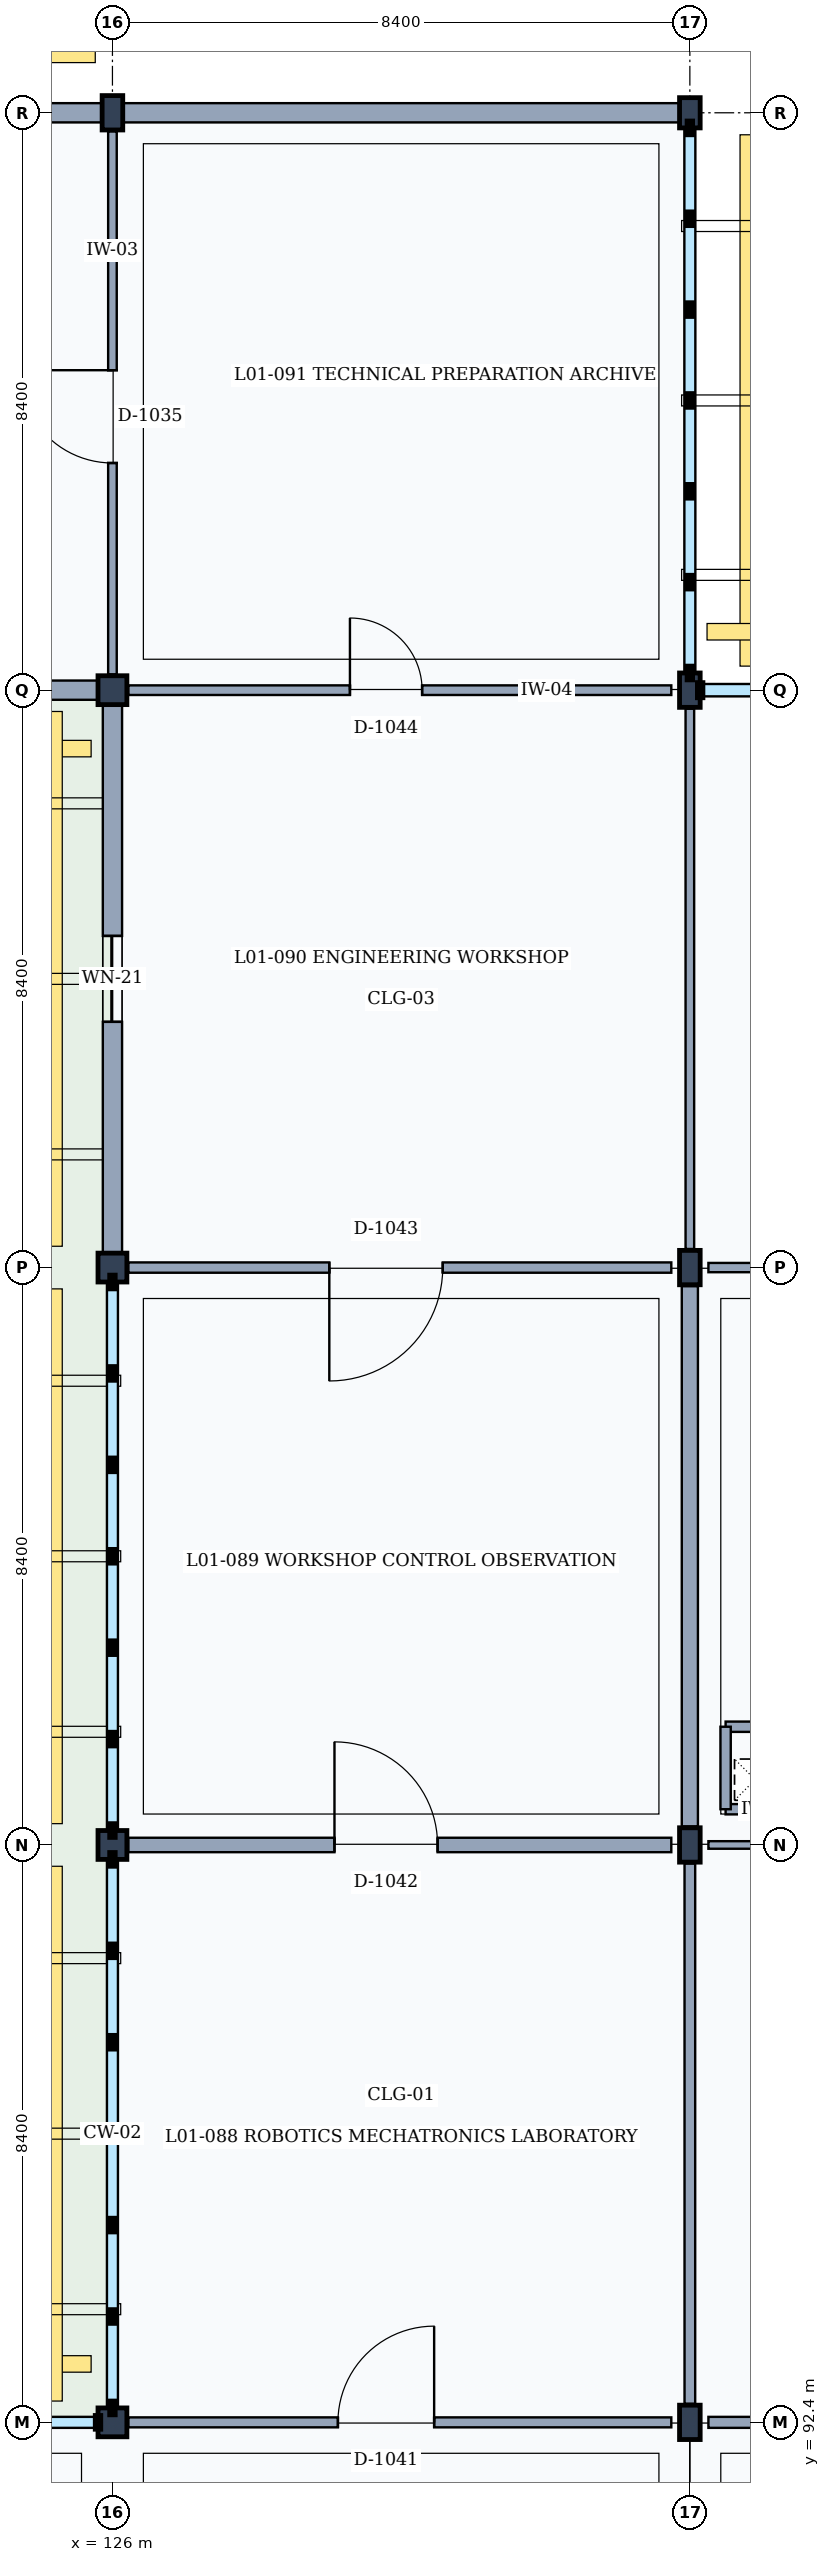
"""IFC4 building model, lengths in metres.
Left out: names, types, materials, properties, quantities, classifications, styles, units other than length and angle.
Written with IfcOpenShell. Run it as: python <this file> out.ifc"""

import sys

from ifc_helpers import new_model, si_unit, direction, frame, frame_2d, origin, origin_2d, place, context, subcontext, project, spatial, rectangle, i_section, extrude, element, fill, save


model = new_model("IFC4")
c1 = context("Model", 3, precision=1e-05, world=origin(), true_north=direction((0.0, 1.0)))
c2 = subcontext(c1, "Body", "Model", "MODEL_VIEW")
j1 = project(units=[si_unit("LENGTHUNIT", "METRE"), si_unit("PLANEANGLEUNIT", "RADIAN")], contexts=[c1])
p1 = place(None, origin())
s1 = spatial("IfcSite", under=j1, at=p1, CompositionType="ELEMENT")
p2 = place(p1, origin())
s2 = spatial("IfcBuilding", under=s1, at=p2, CompositionType="ELEMENT")
p3 = place(p2, frame((0.0, 0.0, 4.8)))
s3 = spatial("IfcBuildingStorey", under=s2, at=p3, CompositionType="ELEMENT", Elevation=4.8)
for number, where, z_axis, x_axis in (
    (1, (126.0, 92.4, 0.0), (0.0, 0.0, 1.0), (1.0, 0.0, 0.0)),
    (2, (126.0, 100.8, 0.0), (0.0, 0.0, 1.0), (1.0, 0.0, 0.0)),
    (3, (126.0, 109.2, 0.0), (0.0, 0.0, 1.0), (1.0, 0.0, 0.0)),
    (4, (126.0, 117.6, 0.0), (0.0, 0.0, 1.0), (1.0, 0.0, 0.0)),
):
    element("IfcColumn", number, at=place(p3, frame(where, z_axis=z_axis, x_axis=x_axis)), inside=s3, PredefinedType="COLUMN", context=c2, shape_type="SweptSolid", body=[
        extrude(rectangle(XDim=0.42, YDim=0.42, at=origin_2d()), origin(), (0.0, 0.0, 1.0), 4.8),
    ])
for number, where, z_axis, x_axis in (
    (5, (126.0, 126.0, 0.0), (0.0, 0.0, 1.0), (1.0, 0.0, 0.0)),
    (6, (134.4, 92.4, 0.0), (0.0, 0.0, 1.0), (1.0, 0.0, 0.0)),
    (7, (134.4, 100.8, 0.0), (0.0, 0.0, 1.0), (1.0, 0.0, 0.0)),
    (8, (134.4, 109.2, 0.0), (0.0, 0.0, 1.0), (1.0, 0.0, 0.0)),
    (9, (134.4, 117.6, 0.0), (0.0, 0.0, 1.0), (1.0, 0.0, 0.0)),
):
    element("IfcColumn", number, at=place(p3, frame(where, z_axis=z_axis, x_axis=x_axis)), inside=s3, PredefinedType="COLUMN", context=c2, shape_type="SweptSolid", body=[
        extrude(i_section(OverallWidth=0.3, OverallDepth=0.5, WebThickness=0.014, FlangeThickness=0.028, FilletRadius=0.027, at=origin_2d()), origin(), (0.0, 0.0, 1.0), 4.8),
    ])
p4 = place(p3, frame((134.4, 126.0, 0.0), z_axis=(0.0, 0.0, 1.0), x_axis=(1.0, 0.0, 0.0)))
e10 = element("IfcColumn", 10, at=p4, inside=s3, PredefinedType="COLUMN", context=c2, shape_type="SweptSolid", body=[
    extrude(i_section(OverallWidth=0.3, OverallDepth=0.44, WebThickness=0.011, FlangeThickness=0.021, FilletRadius=0.027, at=origin_2d()), origin(), (0.0, 0.0, 1.0), 4.8),
])
p5 = place(p3, frame((125.79, 117.6, 0.0), z_axis=(0.0, 0.0, 1.0), x_axis=(-1.0, 0.0, 0.0)))
e11 = element("IfcWall", 11, at=p5, inside=s3, PredefinedType="SOLIDWALL", context=c2, shape_type="SweptSolid", body=[
    extrude(rectangle(XDim=8.0, YDim=0.28, at=frame_2d((4.0, 0.0))), origin(), (0.0, 0.0, 1.0), 3.35),
])
p6 = place(p5, frame((2.85, 0.0, 0.9)))
e12 = element("IfcOpeningElement", 12, at=p6, cuts=e11, PredefinedType="OPENING", context=c2, shape_type="SweptSolid", body=[
    extrude(rectangle(XDim=2.3, YDim=1.5, at=frame_2d((1.15, 0.75))), frame((0.0, 0.15, 0.0), z_axis=(0.0, -1.0, 0.0), x_axis=(1.0, 0.0, 0.0)), (0.0, 0.0, 1.0), 0.3),
])
p7 = place(p3, frame((117.75, 126.0, 0.0), z_axis=(0.0, 0.0, 1.0), x_axis=(1.0, 0.0, 0.0)))
e13 = element("IfcWall", 13, at=p7, inside=s3, PredefinedType="SOLIDWALL", context=c2, shape_type="SweptSolid", body=[
    extrude(rectangle(XDim=8.1, YDim=0.28, at=frame_2d((4.05, 0.0))), origin(), (0.0, 0.0, 1.0), 3.96),
])
p8 = place(p7, frame((2.9, 0.0, 0.9)))
e14 = element("IfcOpeningElement", 14, at=p8, cuts=e13, PredefinedType="OPENING", context=c2, shape_type="SweptSolid", body=[
    extrude(rectangle(XDim=2.3, YDim=1.5, at=frame_2d((1.15, 0.75))), frame((0.0, 0.15, 0.0), z_axis=(0.0, -1.0, 0.0), x_axis=(1.0, 0.0, 0.0)), (0.0, 0.0, 1.0), 0.3),
])
p9 = place(p3, frame((126.0, 109.41, 0.0), z_axis=(0.0, 0.0, 1.0), x_axis=(0.0, 1.0, 0.0)))
e15 = element("IfcWall", 15, at=p9, inside=s3, PredefinedType="SOLIDWALL", context=c2, shape_type="SweptSolid", body=[
    extrude(rectangle(XDim=7.98, YDim=0.28, at=frame_2d((3.99, 0.0))), origin(), (0.0, 0.0, 1.0), 3.96),
])
p10 = place(p9, frame((3.365, 0.0, 0.9)))
e16 = element("IfcOpeningElement", 16, at=p10, cuts=e15, PredefinedType="OPENING", context=c2, shape_type="SweptSolid", body=[
    extrude(rectangle(XDim=1.25, YDim=1.7, at=frame_2d((0.625, 0.85))), frame((0.0, 0.15, 0.0), z_axis=(0.0, -1.0, 0.0), x_axis=(1.0, 0.0, 0.0)), (0.0, 0.0, 1.0), 0.3),
])
p11 = place(p3, frame((126.15, 126.0, 0.0), z_axis=(0.0, 0.0, 1.0), x_axis=(1.0, 0.0, 0.0)))
e17 = element("IfcWall", 17, at=p11, inside=s3, PredefinedType="SOLIDWALL", context=c2, shape_type="SweptSolid", body=[
    extrude(rectangle(XDim=8.1, YDim=0.28, at=frame_2d((4.05, 0.0))), origin(), (0.0, 0.0, 1.0), 3.96),
])
for number, where, z_axis, x_axis in (
    (18, (134.92, 101.32, 0.0), (0.0, 0.0, 1.0), (1.0, 0.0, 0.0)),
    (19, (136.12, 102.52, 0.0), (0.0, 0.0, 1.0), (-1.0, 0.0, 0.0)),
):
    element("IfcWall", number, at=place(p3, frame(where, z_axis=z_axis, x_axis=x_axis)), inside=s3, PredefinedType="PARTITIONING", context=c2, shape_type="SweptSolid", body=[
        extrude(rectangle(XDim=1.2, YDim=0.15, at=frame_2d((0.6, 0.0))), origin(), (0.0, 0.0, 1.0), 4.55),
    ])
p12 = place(p3, frame((134.92, 102.52, 0.0), z_axis=(0.0, 0.0, 1.0), x_axis=(0.0, -1.0, 0.0)))
e20 = element("IfcWall", 20, at=p12, inside=s3, PredefinedType="PARTITIONING", context=c2, shape_type="SweptSolid", body=[
    extrude(rectangle(XDim=1.2, YDim=0.15, at=frame_2d((0.6, 0.0))), origin(), (0.0, 0.0, 1.0), 4.55),
])
p13 = place(p3, frame((126.0, 117.83, 0.0), z_axis=(0.0, 0.0, 1.0), x_axis=(0.0, 1.0, 0.0)))
e21 = element("IfcWall", 21, at=p13, inside=s3, PredefinedType="PARTITIONING", context=c2, shape_type="SweptSolid", body=[
    extrude(rectangle(XDim=7.9, YDim=0.125, at=frame_2d((3.95, 0.0))), origin(), (0.0, 0.0, 1.0), 3.92),
])
p14 = place(p13, frame((3.075, 0.0, 0.0)))
e22 = element("IfcOpeningElement", 22, at=p14, cuts=e21, PredefinedType="OPENING", context=c2, shape_type="SweptSolid", body=[
    extrude(rectangle(XDim=1.35, YDim=2.25, at=frame_2d((0.675, 1.125))), frame((0.0, 0.073, 0.0), z_axis=(0.0, -1.0, 0.0), x_axis=(1.0, 0.0, 0.0)), (0.0, 0.0, 1.0), 0.145),
])
p15 = place(p3, frame((126.23, 92.4, 0.0), z_axis=(0.0, 0.0, 1.0), x_axis=(1.0, 0.0, 0.0)))
e23 = element("IfcWall", 23, at=p15, inside=s3, PredefinedType="PARTITIONING", context=c2, shape_type="SweptSolid", body=[
    extrude(rectangle(XDim=7.9, YDim=0.145, at=frame_2d((3.95, 0.0))), origin(), (0.0, 0.0, 1.0), 3.92),
])
p16 = place(p15, frame((3.05, 0.0, 0.0)))
e24 = element("IfcOpeningElement", 24, at=p16, cuts=e23, PredefinedType="OPENING", context=c2, shape_type="SweptSolid", body=[
    extrude(rectangle(XDim=1.4, YDim=2.25, at=frame_2d((0.7, 1.125))), frame((0.0, 0.083, 0.0), z_axis=(0.0, -1.0, 0.0), x_axis=(1.0, 0.0, 0.0)), (0.0, 0.0, 1.0), 0.165),
])
p17 = place(p3, frame((134.4, 92.67, 0.0), z_axis=(0.0, 0.0, 1.0), x_axis=(0.0, 1.0, 0.0)))
e25 = element("IfcWall", 25, at=p17, inside=s3, PredefinedType="PARTITIONING", context=c2, shape_type="SweptSolid", body=[
    extrude(rectangle(XDim=7.86, YDim=0.155, at=frame_2d((3.93, 0.0))), origin(), (0.0, 0.0, 1.0), 3.92),
])
p18 = place(p3, frame((126.23, 100.8, 0.0), z_axis=(0.0, 0.0, 1.0), x_axis=(1.0, 0.0, 0.0)))
e26 = element("IfcWall", 26, at=p18, inside=s3, PredefinedType="PARTITIONING", context=c2, shape_type="SweptSolid", body=[
    extrude(rectangle(XDim=7.9, YDim=0.21, at=frame_2d((3.95, 0.0))), origin(), (0.0, 0.0, 1.0), 3.92),
])
p19 = place(p18, frame((3.0, 0.0, 0.0)))
e27 = element("IfcOpeningElement", 27, at=p19, cuts=e26, PredefinedType="OPENING", context=c2, shape_type="SweptSolid", body=[
    extrude(rectangle(XDim=1.5, YDim=2.3, at=frame_2d((0.75, 1.15))), frame((0.0, 0.115, 0.0), z_axis=(0.0, -1.0, 0.0), x_axis=(1.0, 0.0, 0.0)), (0.0, 0.0, 1.0), 0.23),
])
p20 = place(p3, frame((134.4, 101.07, 0.0), z_axis=(0.0, 0.0, 1.0), x_axis=(0.0, 1.0, 0.0)))
e28 = element("IfcWall", 28, at=p20, inside=s3, PredefinedType="PARTITIONING", context=c2, shape_type="SweptSolid", body=[
    extrude(rectangle(XDim=7.86, YDim=0.235, at=frame_2d((3.93, 0.0))), origin(), (0.0, 0.0, 1.0), 3.92),
])
p21 = place(p3, frame((126.23, 109.2, 0.0), z_axis=(0.0, 0.0, 1.0), x_axis=(1.0, 0.0, 0.0)))
e29 = element("IfcWall", 29, at=p21, inside=s3, PredefinedType="PARTITIONING", context=c2, shape_type="SweptSolid", body=[
    extrude(rectangle(XDim=7.9, YDim=0.15, at=frame_2d((3.95, 0.0))), origin(), (0.0, 0.0, 1.0), 3.92),
])
p22 = place(p21, frame((2.925, 0.0, 0.0)))
e30 = element("IfcOpeningElement", 30, at=p22, cuts=e29, PredefinedType="OPENING", context=c2, shape_type="SweptSolid", body=[
    extrude(rectangle(XDim=1.65, YDim=2.25, at=frame_2d((0.825, 1.125))), frame((0.0, 0.085, 0.0), z_axis=(0.0, -1.0, 0.0), x_axis=(1.0, 0.0, 0.0)), (0.0, 0.0, 1.0), 0.17),
])
p23 = place(p3, frame((134.4, 109.47, 0.0), z_axis=(0.0, 0.0, 1.0), x_axis=(0.0, 1.0, 0.0)))
e31 = element("IfcWall", 31, at=p23, inside=s3, PredefinedType="PARTITIONING", context=c2, shape_type="SweptSolid", body=[
    extrude(rectangle(XDim=7.86, YDim=0.125, at=frame_2d((3.93, 0.0))), origin(), (0.0, 0.0, 1.0), 3.92),
])
p24 = place(p3, frame((126.23, 117.6, 0.0), z_axis=(0.0, 0.0, 1.0), x_axis=(1.0, 0.0, 0.0)))
e32 = element("IfcWall", 32, at=p24, inside=s3, PredefinedType="PARTITIONING", context=c2, shape_type="SweptSolid", body=[
    extrude(rectangle(XDim=7.9, YDim=0.14, at=frame_2d((3.95, 0.0))), origin(), (0.0, 0.0, 1.0), 3.92),
])
p25 = place(p24, frame((3.225, 0.0, 0.0)))
e33 = element("IfcOpeningElement", 33, at=p25, cuts=e32, PredefinedType="OPENING", context=c2, shape_type="SweptSolid", body=[
    extrude(rectangle(XDim=1.05, YDim=2.2, at=frame_2d((0.525, 1.1))), frame((0.0, 0.08, 0.0), z_axis=(0.0, -1.0, 0.0), x_axis=(1.0, 0.0, 0.0)), (0.0, 0.0, 1.0), 0.16),
])
p26 = place(p3, frame((134.67, 92.4, 0.0), z_axis=(0.0, 0.0, 1.0), x_axis=(1.0, 0.0, 0.0)))
e34 = element("IfcWall", 34, at=p26, inside=s3, PredefinedType="PARTITIONING", context=c2, shape_type="SweptSolid", body=[
    extrude(rectangle(XDim=7.89, YDim=0.16, at=frame_2d((3.945, 0.0))), origin(), (0.0, 0.0, 1.0), 3.91),
])
p27 = place(p26, frame((3.025, 0.0, 0.0)))
e35 = element("IfcOpeningElement", 35, at=p27, cuts=e34, PredefinedType="OPENING", context=c2, shape_type="SweptSolid", body=[
    extrude(rectangle(XDim=1.45, YDim=2.35, at=frame_2d((0.725, 1.175))), frame((0.0, 0.09, 0.0), z_axis=(0.0, -1.0, 0.0), x_axis=(1.0, 0.0, 0.0)), (0.0, 0.0, 1.0), 0.18),
])
p28 = place(p3, frame((134.67, 100.8, 0.0), z_axis=(0.0, 0.0, 1.0), x_axis=(1.0, 0.0, 0.0)))
e36 = element("IfcWall", 36, at=p28, inside=s3, PredefinedType="PARTITIONING", context=c2, shape_type="SweptSolid", body=[
    extrude(rectangle(XDim=7.88, YDim=0.11, at=frame_2d((3.94, 0.0))), origin(), (0.0, 0.0, 1.0), 3.91),
])
p29 = place(p28, frame((3.25, 0.0, 0.0)))
e37 = element("IfcOpeningElement", 37, at=p29, cuts=e36, PredefinedType="OPENING", context=c2, shape_type="SweptSolid", body=[
    extrude(rectangle(XDim=1.0, YDim=2.15, at=frame_2d((0.5, 1.075))), frame((0.0, 0.065, 0.0), z_axis=(0.0, -1.0, 0.0), x_axis=(1.0, 0.0, 0.0)), (0.0, 0.0, 1.0), 0.13),
])
p30 = place(p3, frame((134.67, 109.2, 0.0), z_axis=(0.0, 0.0, 1.0), x_axis=(1.0, 0.0, 0.0)))
e38 = element("IfcWall", 38, at=p30, inside=s3, PredefinedType="PARTITIONING", context=c2, shape_type="SweptSolid", body=[
    extrude(rectangle(XDim=7.89, YDim=0.135, at=frame_2d((3.945, 0.0))), origin(), (0.0, 0.0, 1.0), 3.91),
])
p31 = place(p30, frame((3.275, 0.0, 0.0)))
e39 = element("IfcOpeningElement", 39, at=p31, cuts=e38, PredefinedType="OPENING", context=c2, shape_type="SweptSolid", body=[
    extrude(rectangle(XDim=0.95, YDim=2.15, at=frame_2d((0.475, 1.075))), frame((0.0, 0.077, 0.0), z_axis=(0.0, -1.0, 0.0), x_axis=(1.0, 0.0, 0.0)), (0.0, 0.0, 1.0), 0.155),
])
p32 = place(p10, origin())
e40 = element("IfcWindow", 40, at=p32, inside=s3, PartitioningType="SINGLE_PANEL", PredefinedType="WINDOW", context=c2, shape_type="SweptSolid", body=[
    extrude(rectangle(XDim=1.25, YDim=1.7, at=frame_2d((0.625, 0.85))), frame((0.0, 0.03, 0.0), z_axis=(0.0, -1.0, 0.0), x_axis=(1.0, 0.0, 0.0)), (0.0, 0.0, 1.0), 0.06),
])
fill(e16, e40)
p33 = place(p14, origin())
e41 = element("IfcDoor", 41, at=p33, inside=s3, OperationType="SINGLE_SWING_RIGHT", PredefinedType="DOOR", context=c2, shape_type="SweptSolid", body=[
    extrude(rectangle(XDim=1.35, YDim=2.25, at=frame_2d((0.675, 1.125))), frame((0.0, 0.025, 0.0), z_axis=(0.0, -1.0, 0.0), x_axis=(1.0, 0.0, 0.0)), (0.0, 0.0, 1.0), 0.05),
])
fill(e22, e41)
p34 = place(p16, origin())
e42 = element("IfcDoor", 42, at=p34, inside=s3, OperationType="SINGLE_SWING_RIGHT", PredefinedType="DOOR", context=c2, shape_type="SweptSolid", body=[
    extrude(rectangle(XDim=1.4, YDim=2.25, at=frame_2d((0.7, 1.125))), frame((0.0, 0.025, 0.0), z_axis=(0.0, -1.0, 0.0), x_axis=(1.0, 0.0, 0.0)), (0.0, 0.0, 1.0), 0.05),
])
fill(e24, e42)
p35 = place(p19, origin())
e43 = element("IfcDoor", 43, at=p35, inside=s3, OperationType="SINGLE_SWING_LEFT", PredefinedType="DOOR", context=c2, shape_type="SweptSolid", body=[
    extrude(rectangle(XDim=1.5, YDim=2.3, at=frame_2d((0.75, 1.15))), frame((0.0, 0.025, 0.0), z_axis=(0.0, -1.0, 0.0), x_axis=(1.0, 0.0, 0.0)), (0.0, 0.0, 1.0), 0.05),
])
fill(e27, e43)
p36 = place(p22, frame((1.65, 0.0, 0.0), z_axis=(0.0, 0.0, 1.0), x_axis=(-1.0, 0.0, 0.0)))
e44 = element("IfcDoor", 44, at=p36, inside=s3, OperationType="SINGLE_SWING_RIGHT", PredefinedType="DOOR", context=c2, shape_type="SweptSolid", body=[
    extrude(rectangle(XDim=1.65, YDim=2.25, at=frame_2d((0.825, 1.125))), frame((0.0, 0.025, 0.0), z_axis=(0.0, -1.0, 0.0), x_axis=(1.0, 0.0, 0.0)), (0.0, 0.0, 1.0), 0.05),
])
fill(e30, e44)
p37 = place(p25, origin())
e45 = element("IfcDoor", 45, at=p37, inside=s3, OperationType="SINGLE_SWING_LEFT", PredefinedType="DOOR", context=c2, shape_type="SweptSolid", body=[
    extrude(rectangle(XDim=1.05, YDim=2.2, at=frame_2d((0.525, 1.1))), frame((0.0, 0.025, 0.0), z_axis=(0.0, -1.0, 0.0), x_axis=(1.0, 0.0, 0.0)), (0.0, 0.0, 1.0), 0.05),
])
fill(e33, e45)
save(model, sys.argv[1])
